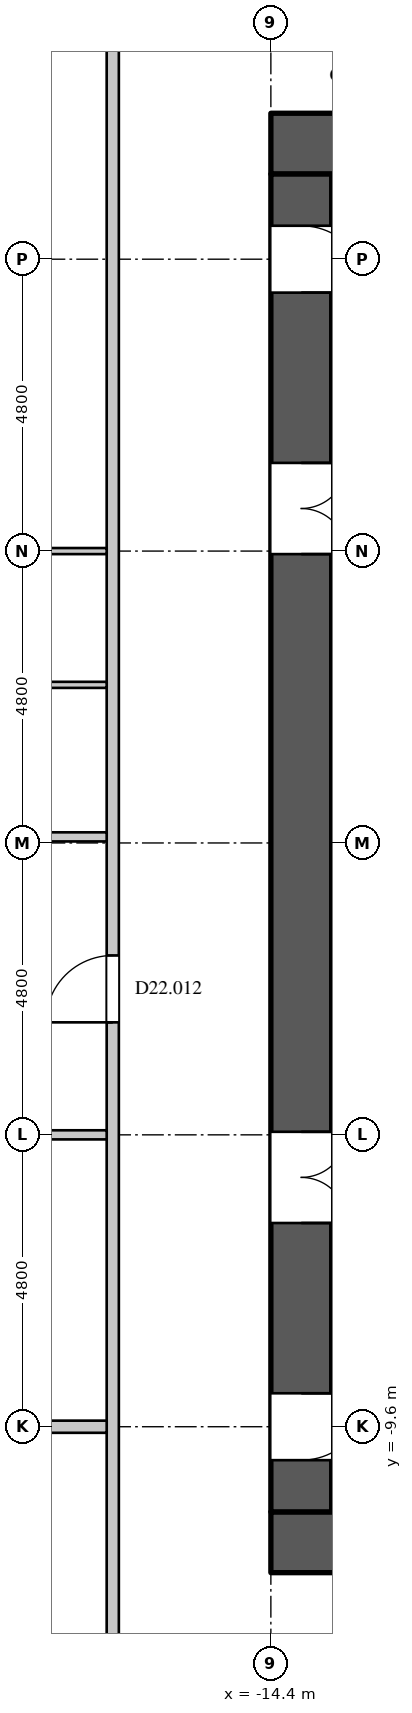
"""IFC4 building model, lengths in metres.
Left out: names, types, materials, properties, quantities, classifications, styles, units other than length and angle.
Written with IfcOpenShell. Run it as: python <this file> out.ifc"""

import sys

from ifc_helpers import new_model, si_unit, direction, frame, frame_2d, origin, place, context, subcontext, project, spatial, rectangle, extrude, element, fill, save


model = new_model("IFC4")
c1 = context("Model", 3, precision=1e-05, world=origin(), true_north=direction((0.0, 1.0)))
c2 = subcontext(c1, "Body", "Model", "MODEL_VIEW")
j1 = project(units=[si_unit("LENGTHUNIT", "METRE"), si_unit("PLANEANGLEUNIT", "RADIAN")], contexts=[c1])
p1 = place(None, origin())
s1 = spatial("IfcSite", under=j1, at=p1, CompositionType="ELEMENT")
p2 = place(p1, origin())
s2 = spatial("IfcBuilding", under=s1, at=p2, CompositionType="ELEMENT")
p3 = place(p2, frame((0.0, 0.0, 96.9)))
s3 = spatial("IfcBuildingStorey", under=s2, at=p3, CompositionType="ELEMENT", Elevation=96.9)
for number, where, z_axis, x_axis in (
    (1, (-14.4, 11.5, 0.0), (0.0, 0.0, 1.0), (1.0, 0.0, 0.0)),
    (2, (-14.4, -11.5, 0.0), (0.0, 0.0, 1.0), (1.0, 0.0, 0.0)),
):
    element("IfcWall", number, at=place(p3, frame(where, z_axis=z_axis, x_axis=x_axis)), inside=s3, PredefinedType="SHEAR", context=c2, shape_type="SweptSolid", body=[
        extrude(rectangle(XDim=28.8, YDim=1.0, at=frame_2d((14.4, 0.0))), origin(), (0.0, 0.0, 1.0), 4.2),
    ])
p4 = place(p3, frame((-13.9, -11.0, 0.0), z_axis=(0.0, 0.0, 1.0), x_axis=(0.0, 1.0, 0.0)))
e3 = element("IfcWall", 3, at=p4, inside=s3, PredefinedType="SHEAR", context=c2, shape_type="SweptSolid", body=[
    extrude(rectangle(XDim=22.0, YDim=1.0, at=frame_2d((11.0, 0.0))), origin(), (0.0, 0.0, 1.0), 4.2),
])
p5 = place(p4, frame((20.05, 0.0, 0.0)))
e4 = element("IfcOpeningElement", 4, at=p5, cuts=e3, PredefinedType="OPENING", context=c2, shape_type="SweptSolid", body=[
    extrude(rectangle(XDim=1.1, YDim=2.2, at=frame_2d((0.55, 1.1))), frame((0.0, 0.51, 0.0), z_axis=(0.0, -1.0, 0.0), x_axis=(1.0, 0.0, 0.0)), (0.0, 0.0, 1.0), 1.02),
])
p6 = place(p4, frame((0.85, 0.0, 0.0)))
e5 = element("IfcOpeningElement", 5, at=p6, cuts=e3, PredefinedType="OPENING", context=c2, shape_type="SweptSolid", body=[
    extrude(rectangle(XDim=1.1, YDim=2.2, at=frame_2d((0.55, 1.1))), frame((0.0, 0.51, 0.0), z_axis=(0.0, -1.0, 0.0), x_axis=(1.0, 0.0, 0.0)), (0.0, 0.0, 1.0), 1.02),
])
p7 = place(p4, frame((15.75, 0.0, 0.0)))
e6 = element("IfcOpeningElement", 6, at=p7, cuts=e3, PredefinedType="OPENING", context=c2, shape_type="SweptSolid", body=[
    extrude(rectangle(XDim=1.5, YDim=2.4, at=frame_2d((0.75, 1.2))), frame((0.0, 0.51, 0.0), z_axis=(0.0, -1.0, 0.0), x_axis=(1.0, 0.0, 0.0)), (0.0, 0.0, 1.0), 1.02),
])
p8 = place(p4, frame((4.75, 0.0, 0.0)))
e7 = element("IfcOpeningElement", 7, at=p8, cuts=e3, PredefinedType="OPENING", context=c2, shape_type="SweptSolid", body=[
    extrude(rectangle(XDim=1.5, YDim=2.4, at=frame_2d((0.75, 1.2))), frame((0.0, 0.51, 0.0), z_axis=(0.0, -1.0, 0.0), x_axis=(1.0, 0.0, 0.0)), (0.0, 0.0, 1.0), 1.02),
])
p9 = place(p3, frame((-17.0, -14.5, 0.0), z_axis=(0.0, 0.0, 1.0), x_axis=(0.0, 1.0, 0.0)))
e8 = element("IfcWall", 8, at=p9, inside=s3, PredefinedType="PARTITIONING", context=c2, shape_type="SweptSolid", body=[
    extrude(rectangle(XDim=29.0, YDim=0.2, at=frame_2d((14.5, 0.0))), origin(), (0.0, 0.0, 1.0), 3.798),
])
p10 = place(p9, frame((11.55, 0.0, 0.0)))
e9 = element("IfcOpeningElement", 9, at=p10, cuts=e8, PredefinedType="OPENING", context=c2, shape_type="SweptSolid", body=[
    extrude(rectangle(XDim=1.1, YDim=2.4, at=frame_2d((0.55, 1.2))), frame((0.0, 0.11, 0.0), z_axis=(0.0, -1.0, 0.0), x_axis=(1.0, 0.0, 0.0)), (0.0, 0.0, 1.0), 0.22),
])
p11 = place(p3, frame((-27.9, -4.8, 0.0), z_axis=(0.0, 0.0, 1.0), x_axis=(1.0, 0.0, 0.0)))
e10 = element("IfcWall", 10, at=p11, inside=s3, PredefinedType="PARTITIONING", context=c2, shape_type="SweptSolid", body=[
    extrude(rectangle(XDim=10.8, YDim=0.15, at=frame_2d((5.4, 0.0))), origin(), (0.0, 0.0, 1.0), 3.1),
])
p12 = place(p11, frame((8.0, 0.0, 0.0)))
e11 = element("IfcOpeningElement", 11, at=p12, cuts=e10, PredefinedType="OPENING", context=c2, shape_type="SweptSolid", body=[
    extrude(rectangle(XDim=0.95, YDim=2.2, at=frame_2d((0.475, 1.1))), frame((0.0, 0.085, 0.0), z_axis=(0.0, -1.0, 0.0), x_axis=(1.0, 0.0, 0.0)), (0.0, 0.0, 1.0), 0.17),
])
p13 = place(p11, frame((1.6, 0.0, 0.0)))
e12 = element("IfcOpeningElement", 12, at=p13, cuts=e10, PredefinedType="OPENING", context=c2, shape_type="SweptSolid", body=[
    extrude(rectangle(XDim=0.95, YDim=2.2, at=frame_2d((0.475, 1.1))), frame((0.0, 0.085, 0.0), z_axis=(0.0, -1.0, 0.0), x_axis=(1.0, 0.0, 0.0)), (0.0, 0.0, 1.0), 0.17),
])
p14 = place(p3, frame((-22.947, -12.051, 0.0), z_axis=(0.0, 0.0, 1.0), x_axis=(0.707106781187, -0.707106781187, 0.0)))
e13 = element("IfcWall", 13, at=p14, inside=s3, PredefinedType="PARTITIONING", context=c2, shape_type="SweptSolid", body=[
    extrude(rectangle(XDim=7.63, YDim=0.15, at=frame_2d((3.815, 0.0))), origin(), (0.0, 0.0, 1.0), 3.798),
])
p15 = place(p14, frame((4.65, 0.0, 0.0)))
e14 = element("IfcOpeningElement", 14, at=p15, cuts=e13, PredefinedType="OPENING", context=c2, shape_type="SweptSolid", body=[
    extrude(rectangle(XDim=0.95, YDim=2.2, at=frame_2d((0.475, 1.1))), frame((0.0, 0.085, 0.0), z_axis=(0.0, -1.0, 0.0), x_axis=(1.0, 0.0, 0.0)), (0.0, 0.0, 1.0), 0.17),
])
p16 = place(p3, frame((-22.747, 11.968, 0.0), z_axis=(0.0, 0.0, 1.0), x_axis=(0.707106781187, 0.707106781187, 0.0)))
e15 = element("IfcWall", 15, at=p16, inside=s3, PredefinedType="PARTITIONING", context=c2, shape_type="SweptSolid", body=[
    extrude(rectangle(XDim=9.913, YDim=0.15, at=frame_2d((4.957, 0.0))), origin(), (0.0, 0.0, 1.0), 3.798),
])
p17 = place(p16, frame((4.45, 0.0, 0.0)))
e16 = element("IfcOpeningElement", 16, at=p17, cuts=e15, PredefinedType="OPENING", context=c2, shape_type="SweptSolid", body=[
    extrude(rectangle(XDim=0.95, YDim=2.2, at=frame_2d((0.475, 1.1))), frame((0.0, 0.085, 0.0), z_axis=(0.0, -1.0, 0.0), x_axis=(1.0, 0.0, 0.0)), (0.0, 0.0, 1.0), 0.17),
])
p18 = place(p16, frame((8.35, 0.0, 0.0)))
e17 = element("IfcOpeningElement", 17, at=p18, cuts=e15, PredefinedType="OPENING", context=c2, shape_type="SweptSolid", body=[
    extrude(rectangle(XDim=0.95, YDim=2.2, at=frame_2d((0.475, 1.1))), frame((0.0, 0.085, 0.0), z_axis=(0.0, -1.0, 0.0), x_axis=(1.0, 0.0, 0.0)), (0.0, 0.0, 1.0), 0.17),
])
p19 = place(p3, frame((-21.725, 0.1, 0.0), z_axis=(0.0, 0.0, 1.0), x_axis=(1.0, 0.0, 0.0)))
e18 = element("IfcWall", 18, at=p19, inside=s3, PredefinedType="PARTITIONING", context=c2, shape_type="SweptSolid", body=[
    extrude(rectangle(XDim=4.625, YDim=0.15, at=frame_2d((2.312, 0.0))), origin(), (0.0, 0.0, 1.0), 3.798),
])
p20 = place(p19, frame((1.85, 0.0, 0.0)))
e19 = element("IfcOpeningElement", 19, at=p20, cuts=e18, PredefinedType="OPENING", context=c2, shape_type="SweptSolid", body=[
    extrude(rectangle(XDim=0.95, YDim=2.2, at=frame_2d((0.475, 1.1))), frame((0.0, 0.085, 0.0), z_axis=(0.0, -1.0, 0.0), x_axis=(1.0, 0.0, 0.0)), (0.0, 0.0, 1.0), 0.17),
])
p21 = place(p3, frame((-28.855, -9.6, 0.0), z_axis=(0.0, 0.0, 1.0), x_axis=(1.0, 0.0, 0.0)))
e20 = element("IfcWall", 20, at=p21, inside=s3, PredefinedType="PARTITIONING", context=c2, shape_type="SweptSolid", body=[
    extrude(rectangle(XDim=11.755, YDim=0.2, at=frame_2d((5.877, 0.0))), origin(), (0.0, 0.0, 1.0), 3.798),
])
p22 = place(p3, frame((-21.78, 4.8, 0.0), z_axis=(0.0, 0.0, 1.0), x_axis=(1.0, 0.0, 0.0)))
e21 = element("IfcWall", 21, at=p22, inside=s3, PredefinedType="PARTITIONING", context=c2, shape_type="SweptSolid", body=[
    extrude(rectangle(XDim=4.68, YDim=0.1, at=frame_2d((2.34, 0.0))), origin(), (0.0, 0.0, 1.0), 3.1),
])
p23 = place(p22, frame((1.95, 0.0, 0.0)))
e22 = element("IfcOpeningElement", 22, at=p23, cuts=e21, PredefinedType="OPENING", context=c2, shape_type="SweptSolid", body=[
    extrude(rectangle(XDim=0.9, YDim=2.2, at=frame_2d((0.45, 1.1))), frame((0.0, 0.06, 0.0), z_axis=(0.0, -1.0, 0.0), x_axis=(1.0, 0.0, 0.0)), (0.0, 0.0, 1.0), 0.12),
])
p24 = place(p3, frame((-21.725, 2.6, 0.0), z_axis=(0.0, 0.0, 1.0), x_axis=(1.0, 0.0, 0.0)))
e23 = element("IfcWall", 23, at=p24, inside=s3, PredefinedType="PARTITIONING", context=c2, shape_type="SweptSolid", body=[
    extrude(rectangle(XDim=4.625, YDim=0.1, at=frame_2d((2.312, 0.0))), origin(), (0.0, 0.0, 1.0), 3.798),
])
p25 = place(p5, origin())
e24 = element("IfcDoor", 24, at=p25, inside=s3, OperationType="SINGLE_SWING_RIGHT", PredefinedType="DOOR", context=c2, shape_type="SweptSolid", body=[
    extrude(rectangle(XDim=1.1, YDim=2.2, at=frame_2d((0.55, 1.1))), frame((0.0, -0.445, 0.0), z_axis=(0.0, -1.0, 0.0), x_axis=(1.0, 0.0, 0.0)), (0.0, 0.0, 1.0), 0.05),
])
fill(e4, e24)
p26 = place(p6, origin())
e25 = element("IfcDoor", 25, at=p26, inside=s3, OperationType="SINGLE_SWING_LEFT", PredefinedType="DOOR", context=c2, shape_type="SweptSolid", body=[
    extrude(rectangle(XDim=1.1, YDim=2.2, at=frame_2d((0.55, 1.1))), frame((0.0, -0.445, 0.0), z_axis=(0.0, -1.0, 0.0), x_axis=(1.0, 0.0, 0.0)), (0.0, 0.0, 1.0), 0.05),
])
fill(e5, e25)
p27 = place(p7, origin())
e26 = element("IfcDoor", 26, at=p27, inside=s3, OperationType="DOUBLE_DOOR_SINGLE_SWING", PredefinedType="DOOR", context=c2, shape_type="SweptSolid", body=[
    extrude(rectangle(XDim=1.5, YDim=2.4, at=frame_2d((0.75, 1.2))), frame((0.0, -0.445, 0.0), z_axis=(0.0, -1.0, 0.0), x_axis=(1.0, 0.0, 0.0)), (0.0, 0.0, 1.0), 0.05),
])
fill(e6, e26)
p28 = place(p8, origin())
e27 = element("IfcDoor", 27, at=p28, inside=s3, OperationType="DOUBLE_DOOR_SINGLE_SWING", PredefinedType="DOOR", context=c2, shape_type="SweptSolid", body=[
    extrude(rectangle(XDim=1.5, YDim=2.4, at=frame_2d((0.75, 1.2))), frame((0.0, -0.445, 0.0), z_axis=(0.0, -1.0, 0.0), x_axis=(1.0, 0.0, 0.0)), (0.0, 0.0, 1.0), 0.05),
])
fill(e7, e27)
p29 = place(p10, origin())
e28 = element("IfcDoor", 28, at=p29, inside=s3, OperationType="SINGLE_SWING_LEFT", PredefinedType="DOOR", context=c2, shape_type="SweptSolid", body=[
    extrude(rectangle(XDim=1.1, YDim=2.4, at=frame_2d((0.55, 1.2))), frame((0.0, 0.025, 0.0), z_axis=(0.0, -1.0, 0.0), x_axis=(1.0, 0.0, 0.0)), (0.0, 0.0, 1.0), 0.05),
])
fill(e9, e28)
save(model, sys.argv[1])
